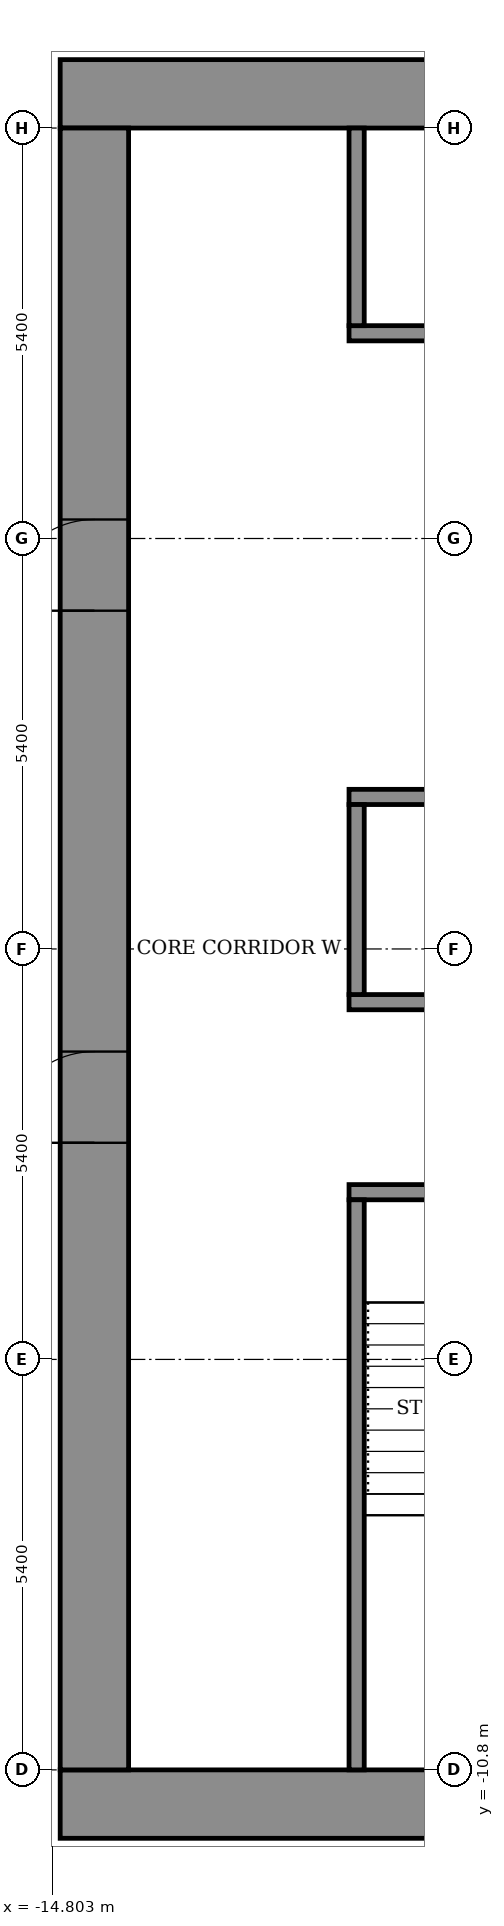
"""IFC4 building model, lengths in metres.
Left out: names, types, materials, properties, quantities, classifications, styles, units other than length and angle.
Written with IfcOpenShell. Run it as: python <this file> out.ifc"""

import sys

from ifc_helpers import new_model, si_unit, direction, frame, frame_2d, origin, place, context, subcontext, project, spatial, rectangle, extrude, element, fill, save


model = new_model("IFC4")
c1 = context("Model", 3, precision=1e-05, world=origin(), true_north=direction((0.0, 1.0)))
c2 = subcontext(c1, "Body", "Model", "MODEL_VIEW")
j1 = project(units=[si_unit("LENGTHUNIT", "METRE"), si_unit("PLANEANGLEUNIT", "RADIAN")], contexts=[c1])
p1 = place(None, origin())
s1 = spatial("IfcSite", under=j1, at=p1, CompositionType="ELEMENT")
p2 = place(p1, origin())
s2 = spatial("IfcBuilding", under=s1, at=p2, CompositionType="ELEMENT")
p3 = place(p2, frame((0.0, 0.0, 144.5)))
s3 = spatial("IfcBuildingStorey", under=s2, at=p3, CompositionType="ELEMENT", Elevation=144.5)
for number, where, z_axis, x_axis in (
    (1, (-14.7, -11.25, 0.0), (0.0, 0.0, 1.0), (1.0, 0.0, 0.0)),
    (2, (-14.7, 11.25, 0.0), (0.0, 0.0, 1.0), (1.0, 0.0, 0.0)),
):
    element("IfcWall", number, at=place(p3, frame(where, z_axis=z_axis, x_axis=x_axis)), inside=s3, PredefinedType="SHEAR", context=c2, shape_type="SweptSolid", body=[
        extrude(rectangle(XDim=29.4, YDim=0.9, at=frame_2d((14.7, 0.0))), origin(), (0.0, 0.0, 1.0), 3.6),
    ])
p4 = place(p3, frame((-14.25, -10.8, 0.0), z_axis=(0.0, 0.0, 1.0), x_axis=(0.0, 1.0, 0.0)))
e3 = element("IfcWall", 3, at=p4, inside=s3, PredefinedType="SHEAR", context=c2, shape_type="SweptSolid", body=[
    extrude(rectangle(XDim=21.6, YDim=0.9, at=frame_2d((10.8, 0.0))), origin(), (0.0, 0.0, 1.0), 3.6),
])
p5 = place(p4, frame((8.25, 0.0, 0.0)))
e4 = element("IfcOpeningElement", 4, at=p5, cuts=e3, PredefinedType="OPENING", context=c2, shape_type="SweptSolid", body=[
    extrude(rectangle(XDim=1.2, YDim=2.1, at=frame_2d((0.6, 1.05))), frame((0.0, 0.46, 0.0), z_axis=(0.0, -1.0, 0.0), x_axis=(1.0, 0.0, 0.0)), (0.0, 0.0, 1.0), 0.92),
])
p6 = place(p4, frame((15.25, 0.0, 0.0)))
e5 = element("IfcOpeningElement", 5, at=p6, cuts=e3, PredefinedType="OPENING", context=c2, shape_type="SweptSolid", body=[
    extrude(rectangle(XDim=1.2, YDim=2.1, at=frame_2d((0.6, 1.05))), frame((0.0, 0.46, 0.0), z_axis=(0.0, -1.0, 0.0), x_axis=(1.0, 0.0, 0.0)), (0.0, 0.0, 1.0), 0.92),
])
p7 = place(p3, frame((-10.9, -3.2, 0.0), z_axis=(0.0, 0.0, 1.0), x_axis=(1.0, 0.0, 0.0)))
e6 = element("IfcWall", 6, at=p7, inside=s3, PredefinedType="SHEAR", context=c2, shape_type="SweptSolid", body=[
    extrude(rectangle(XDim=21.8, YDim=0.2, at=frame_2d((10.9, 0.0))), origin(), (0.0, 0.0, 1.0), 3.05),
])
p8 = place(p7, frame((1.075, 0.0, 0.0)))
e7 = element("IfcOpeningElement", 7, at=p8, cuts=e6, PredefinedType="OPENING", context=c2, shape_type="SweptSolid", body=[
    extrude(rectangle(XDim=1.1, YDim=2.1, at=frame_2d((0.55, 1.05))), frame((0.0, 0.11, 0.0), z_axis=(0.0, -1.0, 0.0), x_axis=(1.0, 0.0, 0.0)), (0.0, 0.0, 1.0), 0.22),
])
p9 = place(p7, frame((10.325, 0.0, 0.0)))
e8 = element("IfcOpeningElement", 8, at=p9, cuts=e6, PredefinedType="OPENING", context=c2, shape_type="SweptSolid", body=[
    extrude(rectangle(XDim=1.1, YDim=2.1, at=frame_2d((0.55, 1.05))), frame((0.0, 0.11, 0.0), z_axis=(0.0, -1.0, 0.0), x_axis=(1.0, 0.0, 0.0)), (0.0, 0.0, 1.0), 0.22),
])
p10 = place(p7, frame((19.625, 0.0, 0.0)))
e9 = element("IfcOpeningElement", 9, at=p10, cuts=e6, PredefinedType="OPENING", context=c2, shape_type="SweptSolid", body=[
    extrude(rectangle(XDim=1.1, YDim=2.1, at=frame_2d((0.55, 1.05))), frame((0.0, 0.11, 0.0), z_axis=(0.0, -1.0, 0.0), x_axis=(1.0, 0.0, 0.0)), (0.0, 0.0, 1.0), 0.22),
])
p11 = place(p7, frame((5.7, 0.0, 0.0)))
e10 = element("IfcOpeningElement", 10, at=p11, cuts=e6, PredefinedType="OPENING", context=c2, shape_type="SweptSolid", body=[
    extrude(rectangle(XDim=1.1, YDim=2.1, at=frame_2d((0.55, 1.05))), frame((0.0, 0.11, 0.0), z_axis=(0.0, -1.0, 0.0), x_axis=(1.0, 0.0, 0.0)), (0.0, 0.0, 1.0), 0.22),
])
p12 = place(p7, frame((14.975, 0.0, 0.0)))
e11 = element("IfcOpeningElement", 11, at=p12, cuts=e6, PredefinedType="OPENING", context=c2, shape_type="SweptSolid", body=[
    extrude(rectangle(XDim=1.1, YDim=2.1, at=frame_2d((0.55, 1.05))), frame((0.0, 0.11, 0.0), z_axis=(0.0, -1.0, 0.0), x_axis=(1.0, 0.0, 0.0)), (0.0, 0.0, 1.0), 0.22),
])
p13 = place(p3, frame((-10.9, -0.7, 0.0), z_axis=(0.0, 0.0, 1.0), x_axis=(1.0, 0.0, 0.0)))
e12 = element("IfcWall", 12, at=p13, inside=s3, PredefinedType="SHEAR", context=c2, shape_type="SweptSolid", body=[
    extrude(rectangle(XDim=21.8, YDim=0.2, at=frame_2d((10.9, 0.0))), origin(), (0.0, 0.0, 1.0), 3.05),
])
p14 = place(p3, frame((-10.9, 2.0, 0.0), z_axis=(0.0, 0.0, 1.0), x_axis=(1.0, 0.0, 0.0)))
e13 = element("IfcWall", 13, at=p14, inside=s3, PredefinedType="SHEAR", context=c2, shape_type="SweptSolid", body=[
    extrude(rectangle(XDim=21.8, YDim=0.2, at=frame_2d((10.9, 0.0))), origin(), (0.0, 0.0, 1.0), 3.05),
])
p15 = place(p14, frame((14.4, 0.0, 0.0)))
e14 = element("IfcOpeningElement", 14, at=p15, cuts=e13, PredefinedType="OPENING", context=c2, shape_type="SweptSolid", body=[
    extrude(rectangle(XDim=1.1, YDim=2.1, at=frame_2d((0.55, 1.05))), frame((0.0, 0.11, 0.0), z_axis=(0.0, -1.0, 0.0), x_axis=(1.0, 0.0, 0.0)), (0.0, 0.0, 1.0), 0.22),
])
p16 = place(p14, frame((17.1, 0.0, 0.0)))
e15 = element("IfcOpeningElement", 15, at=p16, cuts=e13, PredefinedType="OPENING", context=c2, shape_type="SweptSolid", body=[
    extrude(rectangle(XDim=1.1, YDim=2.1, at=frame_2d((0.55, 1.05))), frame((0.0, 0.11, 0.0), z_axis=(0.0, -1.0, 0.0), x_axis=(1.0, 0.0, 0.0)), (0.0, 0.0, 1.0), 0.22),
])
p17 = place(p14, frame((19.8, 0.0, 0.0)))
e16 = element("IfcOpeningElement", 16, at=p17, cuts=e13, PredefinedType="OPENING", context=c2, shape_type="SweptSolid", body=[
    extrude(rectangle(XDim=1.1, YDim=2.1, at=frame_2d((0.55, 1.05))), frame((0.0, 0.11, 0.0), z_axis=(0.0, -1.0, 0.0), x_axis=(1.0, 0.0, 0.0)), (0.0, 0.0, 1.0), 0.22),
])
p18 = place(p14, frame((1.675, 0.0, 0.0)))
e17 = element("IfcOpeningElement", 17, at=p18, cuts=e13, PredefinedType="OPENING", context=c2, shape_type="SweptSolid", body=[
    extrude(rectangle(XDim=0.9, YDim=2.1, at=frame_2d((0.45, 1.05))), frame((0.0, 0.11, 0.0), z_axis=(0.0, -1.0, 0.0), x_axis=(1.0, 0.0, 0.0)), (0.0, 0.0, 1.0), 0.22),
])
p19 = place(p14, frame((8.425, 0.0, 0.0)))
e18 = element("IfcOpeningElement", 18, at=p19, cuts=e13, PredefinedType="OPENING", context=c2, shape_type="SweptSolid", body=[
    extrude(rectangle(XDim=0.9, YDim=2.1, at=frame_2d((0.45, 1.05))), frame((0.0, 0.11, 0.0), z_axis=(0.0, -1.0, 0.0), x_axis=(1.0, 0.0, 0.0)), (0.0, 0.0, 1.0), 0.22),
])
p20 = place(p3, frame((-10.9, 8.1, 0.0), z_axis=(0.0, 0.0, 1.0), x_axis=(1.0, 0.0, 0.0)))
e19 = element("IfcWall", 19, at=p20, inside=s3, PredefinedType="SHEAR", context=c2, shape_type="SweptSolid", body=[
    extrude(rectangle(XDim=21.8, YDim=0.2, at=frame_2d((10.9, 0.0))), origin(), (0.0, 0.0, 1.0), 3.05),
])
p21 = place(p20, frame((14.4, 0.0, 0.0)))
e20 = element("IfcOpeningElement", 20, at=p21, cuts=e19, PredefinedType="OPENING", context=c2, shape_type="SweptSolid", body=[
    extrude(rectangle(XDim=1.1, YDim=2.1, at=frame_2d((0.55, 1.05))), frame((0.0, 0.11, 0.0), z_axis=(0.0, -1.0, 0.0), x_axis=(1.0, 0.0, 0.0)), (0.0, 0.0, 1.0), 0.22),
])
p22 = place(p20, frame((17.1, 0.0, 0.0)))
e21 = element("IfcOpeningElement", 21, at=p22, cuts=e19, PredefinedType="OPENING", context=c2, shape_type="SweptSolid", body=[
    extrude(rectangle(XDim=1.1, YDim=2.1, at=frame_2d((0.55, 1.05))), frame((0.0, 0.11, 0.0), z_axis=(0.0, -1.0, 0.0), x_axis=(1.0, 0.0, 0.0)), (0.0, 0.0, 1.0), 0.22),
])
p23 = place(p20, frame((19.8, 0.0, 0.0)))
e22 = element("IfcOpeningElement", 22, at=p23, cuts=e19, PredefinedType="OPENING", context=c2, shape_type="SweptSolid", body=[
    extrude(rectangle(XDim=1.1, YDim=2.1, at=frame_2d((0.55, 1.05))), frame((0.0, 0.11, 0.0), z_axis=(0.0, -1.0, 0.0), x_axis=(1.0, 0.0, 0.0)), (0.0, 0.0, 1.0), 0.22),
])
p24 = place(p20, frame((1.675, 0.0, 0.0)))
e23 = element("IfcOpeningElement", 23, at=p24, cuts=e19, PredefinedType="OPENING", context=c2, shape_type="SweptSolid", body=[
    extrude(rectangle(XDim=0.9, YDim=2.1, at=frame_2d((0.45, 1.05))), frame((0.0, 0.11, 0.0), z_axis=(0.0, -1.0, 0.0), x_axis=(1.0, 0.0, 0.0)), (0.0, 0.0, 1.0), 0.22),
])
p25 = place(p20, frame((8.425, 0.0, 0.0)))
e24 = element("IfcOpeningElement", 24, at=p25, cuts=e19, PredefinedType="OPENING", context=c2, shape_type="SweptSolid", body=[
    extrude(rectangle(XDim=0.9, YDim=2.1, at=frame_2d((0.45, 1.05))), frame((0.0, 0.11, 0.0), z_axis=(0.0, -1.0, 0.0), x_axis=(1.0, 0.0, 0.0)), (0.0, 0.0, 1.0), 0.22),
])
p26 = place(p3, frame((-10.8, -10.8, 0.0), z_axis=(0.0, 0.0, 1.0), x_axis=(0.0, 1.0, 0.0)))
e25 = element("IfcWall", 25, at=p26, inside=s3, PredefinedType="SHEAR", context=c2, shape_type="SweptSolid", body=[
    extrude(rectangle(XDim=7.5, YDim=0.2, at=frame_2d((3.75, 0.0))), origin(), (0.0, 0.0, 1.0), 3.05),
])
p27 = place(p3, frame((-10.8, -0.6, 0.0), z_axis=(0.0, 0.0, 1.0), x_axis=(0.0, 1.0, 0.0)))
e26 = element("IfcWall", 26, at=p27, inside=s3, PredefinedType="STANDARD", context=c2, shape_type="SweptSolid", body=[
    extrude(rectangle(XDim=2.5, YDim=0.2, at=frame_2d((1.25, 0.0))), origin(), (0.0, 0.0, 1.0), 3.05),
])
p28 = place(p3, frame((-10.8, 8.2, 0.0), z_axis=(0.0, 0.0, 1.0), x_axis=(0.0, 1.0, 0.0)))
e27 = element("IfcWall", 27, at=p28, inside=s3, PredefinedType="STANDARD", context=c2, shape_type="SweptSolid", body=[
    extrude(rectangle(XDim=2.6, YDim=0.2, at=frame_2d((1.3, 0.0))), origin(), (0.0, 0.0, 1.0), 3.05),
])
p29 = place(p5, origin())
e28 = element("IfcDoor", 28, at=p29, inside=s3, OperationType="DOUBLE_DOOR_SINGLE_SWING", PredefinedType="DOOR", context=c2, shape_type="SweptSolid", body=[
    extrude(rectangle(XDim=1.2, YDim=2.1, at=frame_2d((0.6, 1.05))), frame((0.0, 0.025, 0.0), z_axis=(0.0, -1.0, 0.0), x_axis=(1.0, 0.0, 0.0)), (0.0, 0.0, 1.0), 0.05),
])
fill(e4, e28)
p30 = place(p6, origin())
e29 = element("IfcDoor", 29, at=p30, inside=s3, OperationType="DOUBLE_DOOR_SINGLE_SWING", PredefinedType="DOOR", context=c2, shape_type="SweptSolid", body=[
    extrude(rectangle(XDim=1.2, YDim=2.1, at=frame_2d((0.6, 1.05))), frame((0.0, 0.025, 0.0), z_axis=(0.0, -1.0, 0.0), x_axis=(1.0, 0.0, 0.0)), (0.0, 0.0, 1.0), 0.05),
])
fill(e5, e29)
save(model, sys.argv[1])
